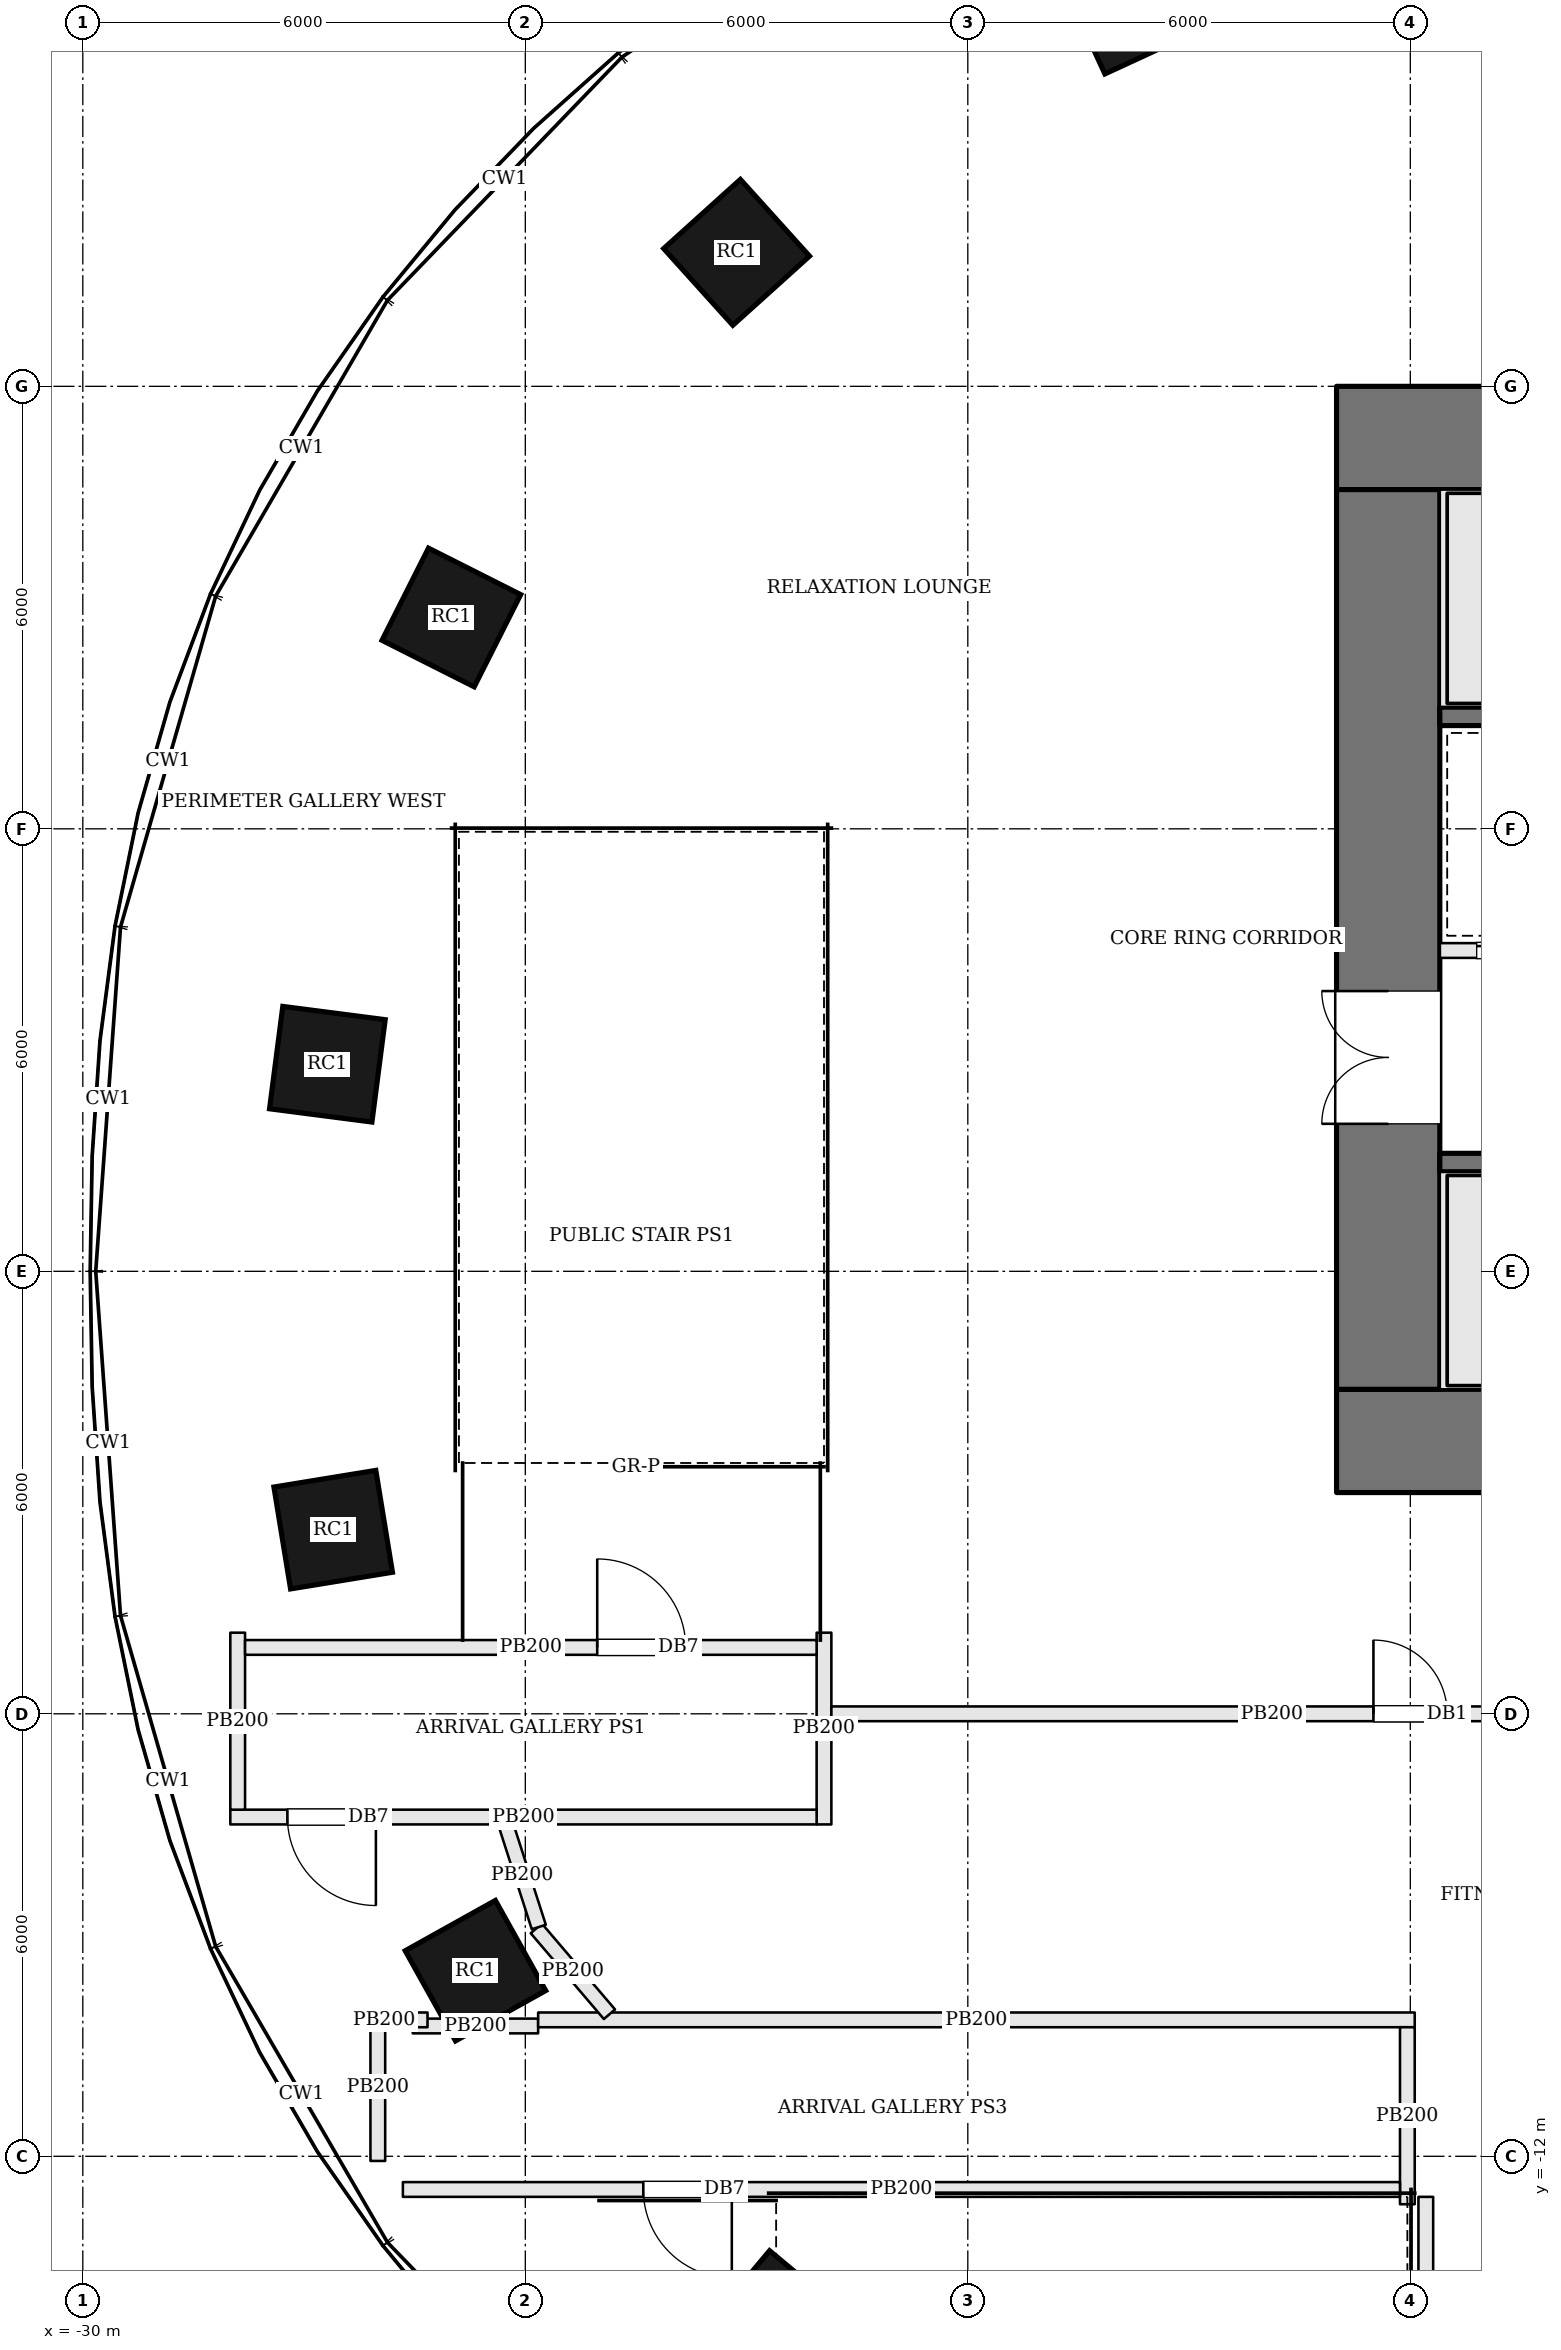
"""IFC4 building model, lengths in metres.
Left out: names, types, materials, properties, quantities, classifications, styles, units other than length and angle.
Written with IfcOpenShell. Run it as: python <this file> out.ifc"""

import sys

from ifc_helpers import new_model, si_unit, direction, frame, frame_2d, origin, origin_2d, place, context, subcontext, project, spatial, rectangle, extrude, element, fill, save


model = new_model("IFC4")
c1 = context("Model", 3, precision=1e-05, world=origin(), true_north=direction((0.0, 1.0)))
c2 = subcontext(c1, "Body", "Model", "MODEL_VIEW")
j1 = project(units=[si_unit("LENGTHUNIT", "METRE"), si_unit("PLANEANGLEUNIT", "RADIAN")], contexts=[c1])
p1 = place(None, origin())
s1 = spatial("IfcSite", under=j1, at=p1, CompositionType="ELEMENT")
p2 = place(p1, origin())
s2 = spatial("IfcBuilding", under=s1, at=p2, CompositionType="ELEMENT")
p3 = place(p2, frame((0.0, 0.0, 28.2)))
s3 = spatial("IfcBuildingStorey", under=s2, at=p3, CompositionType="ELEMENT", Elevation=28.2)
p4 = place(p3, frame((-13.0, 11.3, 0.0), z_axis=(0.0, 0.0, 1.0), x_axis=(1.0, 0.0, 0.0)))
e1 = element("IfcWall", 1, at=p4, inside=s3, PredefinedType="SHEAR", context=c2, shape_type="SweptSolid", body=[
    extrude(rectangle(XDim=26.0, YDim=1.4, at=frame_2d((13.0, 0.0))), origin(), (0.0, 0.0, 1.0), 4.8),
])
p5 = place(p4, frame((8.825, 0.0, 0.0)))
e2 = element("IfcOpeningElement", 2, at=p5, cuts=e1, PredefinedType="OPENING", context=c2, shape_type="SweptSolid", body=[
    extrude(rectangle(XDim=1.0, YDim=2.1, at=frame_2d((0.5, 1.05))), frame((0.0, 0.71, 0.0), z_axis=(0.0, -1.0, 0.0), x_axis=(1.0, 0.0, 0.0)), (0.0, 0.0, 1.0), 1.42),
])
p6 = place(p4, frame((11.425, 0.0, 0.0)))
e3 = element("IfcOpeningElement", 3, at=p6, cuts=e1, PredefinedType="OPENING", context=c2, shape_type="SweptSolid", body=[
    extrude(rectangle(XDim=0.7, YDim=2.1, at=frame_2d((0.35, 1.05))), frame((0.0, 0.71, 0.0), z_axis=(0.0, -1.0, 0.0), x_axis=(1.0, 0.0, 0.0)), (0.0, 0.0, 1.0), 1.42),
])
p7 = place(p4, frame((13.475, 0.0, 0.0)))
e4 = element("IfcOpeningElement", 4, at=p7, cuts=e1, PredefinedType="OPENING", context=c2, shape_type="SweptSolid", body=[
    extrude(rectangle(XDim=0.7, YDim=2.1, at=frame_2d((0.35, 1.05))), frame((0.0, 0.71, 0.0), z_axis=(0.0, -1.0, 0.0), x_axis=(1.0, 0.0, 0.0)), (0.0, 0.0, 1.0), 1.42),
])
p8 = place(p4, frame((14.85, 0.0, 0.0)))
e5 = element("IfcOpeningElement", 5, at=p8, cuts=e1, PredefinedType="OPENING", context=c2, shape_type="SweptSolid", body=[
    extrude(rectangle(XDim=1.0, YDim=2.1, at=frame_2d((0.5, 1.05))), frame((0.0, 0.71, 0.0), z_axis=(0.0, -1.0, 0.0), x_axis=(1.0, 0.0, 0.0)), (0.0, 0.0, 1.0), 1.42),
])
p9 = place(p3, frame((-13.0, -2.3, 0.0), z_axis=(0.0, 0.0, 1.0), x_axis=(1.0, 0.0, 0.0)))
e6 = element("IfcWall", 6, at=p9, inside=s3, PredefinedType="SHEAR", context=c2, shape_type="SweptSolid", body=[
    extrude(rectangle(XDim=26.0, YDim=1.4, at=frame_2d((13.0, 0.0))), origin(), (0.0, 0.0, 1.0), 4.8),
])
p10 = place(p9, frame((9.45, 0.0, 0.0)))
e7 = element("IfcOpeningElement", 7, at=p10, cuts=e6, PredefinedType="OPENING", context=c2, shape_type="SweptSolid", body=[
    extrude(rectangle(XDim=0.9, YDim=2.1, at=frame_2d((0.45, 1.05))), frame((0.0, 0.71, 0.0), z_axis=(0.0, -1.0, 0.0), x_axis=(1.0, 0.0, 0.0)), (0.0, 0.0, 1.0), 1.42),
])
p11 = place(p9, frame((12.7, 0.0, 0.0)))
e8 = element("IfcOpeningElement", 8, at=p11, cuts=e6, PredefinedType="OPENING", context=c2, shape_type="SweptSolid", body=[
    extrude(rectangle(XDim=0.9, YDim=2.1, at=frame_2d((0.45, 1.05))), frame((0.0, 0.71, 0.0), z_axis=(0.0, -1.0, 0.0), x_axis=(1.0, 0.0, 0.0)), (0.0, 0.0, 1.0), 1.42),
])
p12 = place(p9, frame((15.0, 0.0, 0.0)))
e9 = element("IfcOpeningElement", 9, at=p12, cuts=e6, PredefinedType="OPENING", context=c2, shape_type="SweptSolid", body=[
    extrude(rectangle(XDim=1.0, YDim=2.1, at=frame_2d((0.5, 1.05))), frame((0.0, 0.71, 0.0), z_axis=(0.0, -1.0, 0.0), x_axis=(1.0, 0.0, 0.0)), (0.0, 0.0, 1.0), 1.42),
])
p13 = place(p9, frame((16.7, 0.0, 0.0)))
e10 = element("IfcOpeningElement", 10, at=p13, cuts=e6, PredefinedType="OPENING", context=c2, shape_type="SweptSolid", body=[
    extrude(rectangle(XDim=0.9, YDim=2.1, at=frame_2d((0.45, 1.05))), frame((0.0, 0.71, 0.0), z_axis=(0.0, -1.0, 0.0), x_axis=(1.0, 0.0, 0.0)), (0.0, 0.0, 1.0), 1.42),
])
p14 = place(p3, frame((-12.3, -1.6, 0.0), z_axis=(0.0, 0.0, 1.0), x_axis=(0.0, 1.0, 0.0)))
e11 = element("IfcWall", 11, at=p14, inside=s3, PredefinedType="SHEAR", context=c2, shape_type="SweptSolid", body=[
    extrude(rectangle(XDim=12.2, YDim=1.4, at=frame_2d((6.1, 0.0))), origin(), (0.0, 0.0, 1.0), 4.8),
])
p15 = place(p14, frame((3.6, 0.0, 0.0)))
e12 = element("IfcOpeningElement", 12, at=p15, cuts=e11, PredefinedType="OPENING", context=c2, shape_type="SweptSolid", body=[
    extrude(rectangle(XDim=1.8, YDim=2.1, at=frame_2d((0.9, 1.05))), frame((0.0, 0.71, 0.0), z_axis=(0.0, -1.0, 0.0), x_axis=(1.0, 0.0, 0.0)), (0.0, 0.0, 1.0), 1.42),
])
for number, where, z_axis, x_axis in (
    (13, (-15.799, 17.165, 0.0), (0.0, 0.0, 1.0), (-0.908, -0.419, 0.0)),
    (14, (-21.135, 13.817, 0.0), (0.0, 0.0, 1.0), (-0.743, -0.67, 0.0)),
    (15, (-25.003, 8.866, 0.0), (0.0, 0.0, 1.0), (-0.45, -0.893, 0.0)),
    (16, (-26.684, 2.808, 0.0), (0.0, 0.0, 1.0), (-0.128, -0.992, 0.0)),
    (17, (-26.605, -3.503, 0.0), (0.0, 0.0, 1.0), (0.161, -0.987, 0.0)),
    (18, (-24.676, -9.483, 0.0), (0.0, 0.0, 1.0), (0.487, -0.873, 0.0)),
    (19, (-20.6, -14.266, 0.0), (0.0, 0.0, 1.0), (0.767, -0.641, 0.0)),
):
    element("IfcColumn", number, at=place(p3, frame(where, z_axis=z_axis, x_axis=x_axis)), inside=s3, PredefinedType="COLUMN", context=c2, shape_type="SweptSolid", body=[
        extrude(rectangle(XDim=1.4, YDim=1.4, at=origin_2d()), origin(), (0.0, 0.0, 1.0), 4.8),
    ])
p16 = place(p3, frame((-11.6, 1.475, 0.0), z_axis=(0.0, 0.0, 1.0), x_axis=(1.0, 0.0, 0.0)))
e20 = element("IfcWall", 20, at=p16, inside=s3, PredefinedType="SOLIDWALL", context=c2, shape_type="SweptSolid", body=[
    extrude(rectangle(XDim=6.5, YDim=0.25, at=frame_2d((3.25, 0.0))), origin(), (0.0, 0.0, 1.0), 4.5),
])
p17 = place(p16, frame((5.2, 0.0, 0.0)))
e21 = element("IfcOpeningElement", 21, at=p17, cuts=e20, PredefinedType="OPENING", context=c2, shape_type="SweptSolid", body=[
    extrude(rectangle(XDim=1.2, YDim=2.1, at=frame_2d((0.6, 1.05))), frame((0.0, 0.135, 0.0), z_axis=(0.0, -1.0, 0.0), x_axis=(1.0, 0.0, 0.0)), (0.0, 0.0, 1.0), 0.27),
])
p18 = place(p3, frame((-11.6, 4.35, 0.0), z_axis=(0.0, 0.0, 1.0), x_axis=(1.0, 0.0, 0.0)))
e22 = element("IfcWall", 22, at=p18, inside=s3, PredefinedType="SOLIDWALL", context=c2, shape_type="SweptSolid", body=[
    extrude(rectangle(XDim=6.5, YDim=0.2, at=frame_2d((3.25, 0.0))), origin(), (0.0, 0.0, 1.0), 4.5),
])
p19 = place(p18, frame((3.8, 0.0, 0.0)))
e23 = element("IfcOpeningElement", 23, at=p19, cuts=e22, PredefinedType="OPENING", context=c2, shape_type="SweptSolid", body=[
    extrude(rectangle(XDim=1.2, YDim=2.1, at=frame_2d((0.6, 1.05))), frame((0.0, 0.11, 0.0), z_axis=(0.0, -1.0, 0.0), x_axis=(1.0, 0.0, 0.0)), (0.0, 0.0, 1.0), 0.22),
])
p20 = place(p18, frame((0.5, 0.0, 0.0)))
e24 = element("IfcOpeningElement", 24, at=p20, cuts=e22, PredefinedType="OPENING", context=c2, shape_type="SweptSolid", body=[
    extrude(rectangle(XDim=1.2, YDim=2.1, at=frame_2d((0.6, 1.05))), frame((0.0, 0.11, 0.0), z_axis=(0.0, -1.0, 0.0), x_axis=(1.0, 0.0, 0.0)), (0.0, 0.0, 1.0), 0.22),
])
p21 = place(p3, frame((-11.6, 7.525, 0.0), z_axis=(0.0, 0.0, 1.0), x_axis=(1.0, 0.0, 0.0)))
e25 = element("IfcWall", 25, at=p21, inside=s3, PredefinedType="SOLIDWALL", context=c2, shape_type="SweptSolid", body=[
    extrude(rectangle(XDim=6.5, YDim=0.25, at=frame_2d((3.25, 0.0))), origin(), (0.0, 0.0, 1.0), 4.5),
])
p22 = place(p21, frame((5.2, 0.0, 0.0)))
e26 = element("IfcOpeningElement", 26, at=p22, cuts=e25, PredefinedType="OPENING", context=c2, shape_type="SweptSolid", body=[
    extrude(rectangle(XDim=1.2, YDim=2.1, at=frame_2d((0.6, 1.05))), frame((0.0, 0.135, 0.0), z_axis=(0.0, -1.0, 0.0), x_axis=(1.0, 0.0, 0.0)), (0.0, 0.0, 1.0), 0.27),
])
p23 = place(p3, frame((-19.95, -4.9, 0.0), z_axis=(0.0, 0.0, 1.0), x_axis=(0.0, -1.0, 0.0)))
e27 = element("IfcWall", 27, at=p23, inside=s3, PredefinedType="PARTITIONING", context=c2, shape_type="SweptSolid", body=[
    extrude(rectangle(XDim=2.6, YDim=0.2, at=frame_2d((1.3, 0.0))), origin(), (0.0, 0.0, 1.0), 3.78),
])
p24 = place(p3, frame((-20.05, -7.4, 0.0), z_axis=(0.0, 0.0, 1.0), x_axis=(-1.0, 0.0, 0.0)))
e28 = element("IfcWall", 28, at=p24, inside=s3, PredefinedType="PARTITIONING", context=c2, shape_type="SweptSolid", body=[
    extrude(rectangle(XDim=7.95, YDim=0.2, at=frame_2d((3.975, 0.0))), origin(), (0.0, 0.0, 1.0), 3.78),
])
p25 = place(p24, frame((5.976, 0.0, 0.0)))
e29 = element("IfcOpeningElement", 29, at=p25, cuts=e28, PredefinedType="OPENING", context=c2, shape_type="SweptSolid", body=[
    extrude(rectangle(XDim=1.2, YDim=2.1, at=frame_2d((0.6, 1.05))), frame((0.0, 0.11, 0.0), z_axis=(0.0, -1.0, 0.0), x_axis=(1.0, 0.0, 0.0)), (0.0, 0.0, 1.0), 0.22),
])
p26 = place(p3, frame((-27.9, -7.3, 0.0), z_axis=(0.0, 0.0, 1.0), x_axis=(0.0, 1.0, 0.0)))
e30 = element("IfcWall", 30, at=p26, inside=s3, PredefinedType="PARTITIONING", context=c2, shape_type="SweptSolid", body=[
    extrude(rectangle(XDim=2.4, YDim=0.2, at=frame_2d((1.2, 0.0))), origin(), (0.0, 0.0, 1.0), 3.78),
])
p27 = place(p3, frame((-27.8, -5.1, 0.0), z_axis=(0.0, 0.0, 1.0), x_axis=(1.0, 0.0, 0.0)))
e31 = element("IfcWall", 31, at=p27, inside=s3, PredefinedType="PARTITIONING", context=c2, shape_type="SweptSolid", body=[
    extrude(rectangle(XDim=7.75, YDim=0.2, at=frame_2d((3.875, 0.0))), origin(), (0.0, 0.0, 1.0), 3.78),
])
p28 = place(p27, frame((4.775, 0.0, 0.0)))
e32 = element("IfcOpeningElement", 32, at=p28, cuts=e31, PredefinedType="OPENING", context=c2, shape_type="SweptSolid", body=[
    extrude(rectangle(XDim=1.2, YDim=2.1, at=frame_2d((0.6, 1.05))), frame((0.0, 0.11, 0.0), z_axis=(0.0, -1.0, 0.0), x_axis=(1.0, 0.0, 0.0)), (0.0, 0.0, 1.0), 0.22),
])
p29 = place(p3, frame((-25.526, -10.233, 0.0), z_axis=(0.0, 0.0, 1.0), x_axis=(1.0, 0.0, 0.0)))
e33 = element("IfcWall", 33, at=p29, inside=s3, PredefinedType="PARTITIONING", context=c2, shape_type="SweptSolid", body=[
    extrude(rectangle(XDim=1.7, YDim=0.2, at=frame_2d((0.85, 0.0))), origin(), (0.0, 0.0, 1.0), 3.78),
])
p30 = place(p3, frame((-23.826, -10.15, 0.0), z_axis=(0.0, 0.0, 1.0), x_axis=(1.0, 0.0, 0.0)))
e34 = element("IfcWall", 34, at=p30, inside=s3, PredefinedType="PARTITIONING", context=c2, shape_type="SweptSolid", body=[
    extrude(rectangle(XDim=11.886, YDim=0.2, at=frame_2d((5.943, 0.0))), origin(), (0.0, 0.0, 1.0), 3.78),
])
p31 = place(p3, frame((-12.04, -10.25, 0.0), z_axis=(0.0, 0.0, 1.0), x_axis=(0.0, -1.0, 0.0)))
e35 = element("IfcWall", 35, at=p31, inside=s3, PredefinedType="PARTITIONING", context=c2, shape_type="SweptSolid", body=[
    extrude(rectangle(XDim=2.4, YDim=0.2, at=frame_2d((1.2, 0.0))), origin(), (0.0, 0.0, 1.0), 3.78),
])
p32 = place(p3, frame((-12.14, -12.45, 0.0), z_axis=(0.0, 0.0, 1.0), x_axis=(-1.0, 0.0, 0.0)))
e36 = element("IfcWall", 36, at=p32, inside=s3, PredefinedType="PARTITIONING", context=c2, shape_type="SweptSolid", body=[
    extrude(rectangle(XDim=13.52, YDim=0.2, at=frame_2d((6.76, 0.0))), origin(), (0.0, 0.0, 1.0), 3.78),
])
p33 = place(p32, frame((9.06, 0.0, 0.0)))
e37 = element("IfcOpeningElement", 37, at=p33, cuts=e36, PredefinedType="OPENING", context=c2, shape_type="SweptSolid", body=[
    extrude(rectangle(XDim=1.2, YDim=2.1, at=frame_2d((0.6, 1.05))), frame((0.0, 0.11, 0.0), z_axis=(0.0, -1.0, 0.0), x_axis=(1.0, 0.0, 0.0)), (0.0, 0.0, 1.0), 0.22),
])
p34 = place(p3, frame((-26.0, -12.063, 0.0), z_axis=(0.0, 0.0, 1.0), x_axis=(0.0, 1.0, 0.0)))
e38 = element("IfcWall", 38, at=p34, inside=s3, PredefinedType="PARTITIONING", context=c2, shape_type="SweptSolid", body=[
    extrude(rectangle(XDim=2.013, YDim=0.2, at=frame_2d((1.006, 0.0))), origin(), (0.0, 0.0, 1.0), 3.78),
])
p35 = place(p3, frame((-25.9, -10.15, 0.0), z_axis=(0.0, 0.0, 1.0), x_axis=(1.0, 0.0, 0.0)))
e39 = element("IfcWall", 39, at=p35, inside=s3, PredefinedType="PARTITIONING", context=c2, shape_type="SweptSolid", body=[
    extrude(rectangle(XDim=0.574, YDim=0.2, at=frame_2d((0.287, 0.0))), origin(), (0.0, 0.0, 1.0), 3.78),
])
p36 = place(p3, frame((-11.79, -17.273, 0.0), z_axis=(0.0, 0.0, 1.0), x_axis=(0.0, 1.0, 0.0)))
e40 = element("IfcWall", 40, at=p36, inside=s3, PredefinedType="PARTITIONING", context=c2, shape_type="SweptSolid", body=[
    extrude(rectangle(XDim=4.723, YDim=0.2, at=frame_2d((2.361, 0.0))), origin(), (0.0, 0.0, 1.0), 3.78),
])
p37 = place(p3, frame((-22.859, -10.074, 0.0), z_axis=(0.0, 0.0, 1.0), x_axis=(-0.648685680777, 0.761056428628, 0.0)))
e41 = element("IfcWall", 41, at=p37, inside=s3, PredefinedType="PARTITIONING", context=c2, shape_type="SweptSolid", body=[
    extrude(rectangle(XDim=1.53, YDim=0.2, at=frame_2d((0.765, 0.0))), origin(), (0.0, 0.0, 1.0), 3.78),
])
p38 = place(p3, frame((-23.817, -8.891, 0.0), z_axis=(0.0, 0.0, 1.0), x_axis=(-0.306321721395, 0.951928045076, 0.0)))
e42 = element("IfcWall", 42, at=p38, inside=s3, PredefinedType="PARTITIONING", context=c2, shape_type="SweptSolid", body=[
    extrude(rectangle(XDim=1.467, YDim=0.2, at=frame_2d((0.733, 0.0))), origin(), (0.0, 0.0, 1.0), 3.78),
])
p39 = place(p3, frame((-19.85, -6.0, 0.0), z_axis=(0.0, 0.0, 1.0), x_axis=(1.0, 0.0, 0.0)))
e43 = element("IfcWall", 43, at=p39, inside=s3, PredefinedType="PARTITIONING", context=c2, shape_type="SweptSolid", body=[
    extrude(rectangle(XDim=11.95, YDim=0.2, at=frame_2d((5.975, 0.0))), origin(), (0.0, 0.0, 1.0), 3.78),
])
p40 = place(p39, frame((7.35, 0.0, 0.0)))
e44 = element("IfcOpeningElement", 44, at=p40, cuts=e43, PredefinedType="OPENING", context=c2, shape_type="SweptSolid", body=[
    extrude(rectangle(XDim=1.0, YDim=2.1, at=frame_2d((0.5, 1.05))), frame((0.0, 0.11, 0.0), z_axis=(0.0, -1.0, 0.0), x_axis=(1.0, 0.0, 0.0)), (0.0, 0.0, 1.0), 0.22),
])
p41 = place(p15, origin())
e45 = element("IfcDoor", 45, at=p41, inside=s3, OperationType="DOUBLE_DOOR_SINGLE_SWING", PredefinedType="DOOR", context=c2, shape_type="SweptSolid", body=[
    extrude(rectangle(XDim=1.8, YDim=2.1, at=frame_2d((0.9, 1.05))), frame((0.0, 0.025, 0.0), z_axis=(0.0, -1.0, 0.0), x_axis=(1.0, 0.0, 0.0)), (0.0, 0.0, 1.0), 0.05),
])
fill(e12, e45)
p42 = place(p20, origin())
e46 = element("IfcDoor", 46, at=p42, inside=s3, OperationType="SLIDING_TO_RIGHT", PredefinedType="DOOR", context=c2, shape_type="SweptSolid", body=[
    extrude(rectangle(XDim=1.2, YDim=2.1, at=frame_2d((0.6, 1.05))), frame((0.0, 0.025, 0.0), z_axis=(0.0, -1.0, 0.0), x_axis=(1.0, 0.0, 0.0)), (0.0, 0.0, 1.0), 0.05),
])
fill(e24, e46)
p43 = place(p28, origin())
e47 = element("IfcDoor", 47, at=p43, inside=s3, OperationType="SINGLE_SWING_LEFT", PredefinedType="DOOR", context=c2, shape_type="SweptSolid", body=[
    extrude(rectangle(XDim=1.2, YDim=2.1, at=frame_2d((0.6, 1.05))), frame((0.0, 0.025, 0.0), z_axis=(0.0, -1.0, 0.0), x_axis=(1.0, 0.0, 0.0)), (0.0, 0.0, 1.0), 0.05),
])
fill(e32, e47)
p44 = place(p25, origin())
e48 = element("IfcDoor", 48, at=p44, inside=s3, OperationType="SINGLE_SWING_LEFT", PredefinedType="DOOR", context=c2, shape_type="SweptSolid", body=[
    extrude(rectangle(XDim=1.2, YDim=2.1, at=frame_2d((0.6, 1.05))), frame((0.0, 0.025, 0.0), z_axis=(0.0, -1.0, 0.0), x_axis=(1.0, 0.0, 0.0)), (0.0, 0.0, 1.0), 0.05),
])
fill(e29, e48)
p45 = place(p33, origin())
e49 = element("IfcDoor", 49, at=p45, inside=s3, OperationType="SINGLE_SWING_LEFT", PredefinedType="DOOR", context=c2, shape_type="SweptSolid", body=[
    extrude(rectangle(XDim=1.2, YDim=2.1, at=frame_2d((0.6, 1.05))), frame((0.0, 0.025, 0.0), z_axis=(0.0, -1.0, 0.0), x_axis=(1.0, 0.0, 0.0)), (0.0, 0.0, 1.0), 0.05),
])
fill(e37, e49)
p46 = place(p40, origin())
e50 = element("IfcDoor", 50, at=p46, inside=s3, OperationType="SINGLE_SWING_LEFT", PredefinedType="DOOR", context=c2, shape_type="SweptSolid", body=[
    extrude(rectangle(XDim=1.0, YDim=2.1, at=frame_2d((0.5, 1.05))), frame((0.0, 0.025, 0.0), z_axis=(0.0, -1.0, 0.0), x_axis=(1.0, 0.0, 0.0)), (0.0, 0.0, 1.0), 0.05),
])
fill(e44, e50)
save(model, sys.argv[1])
